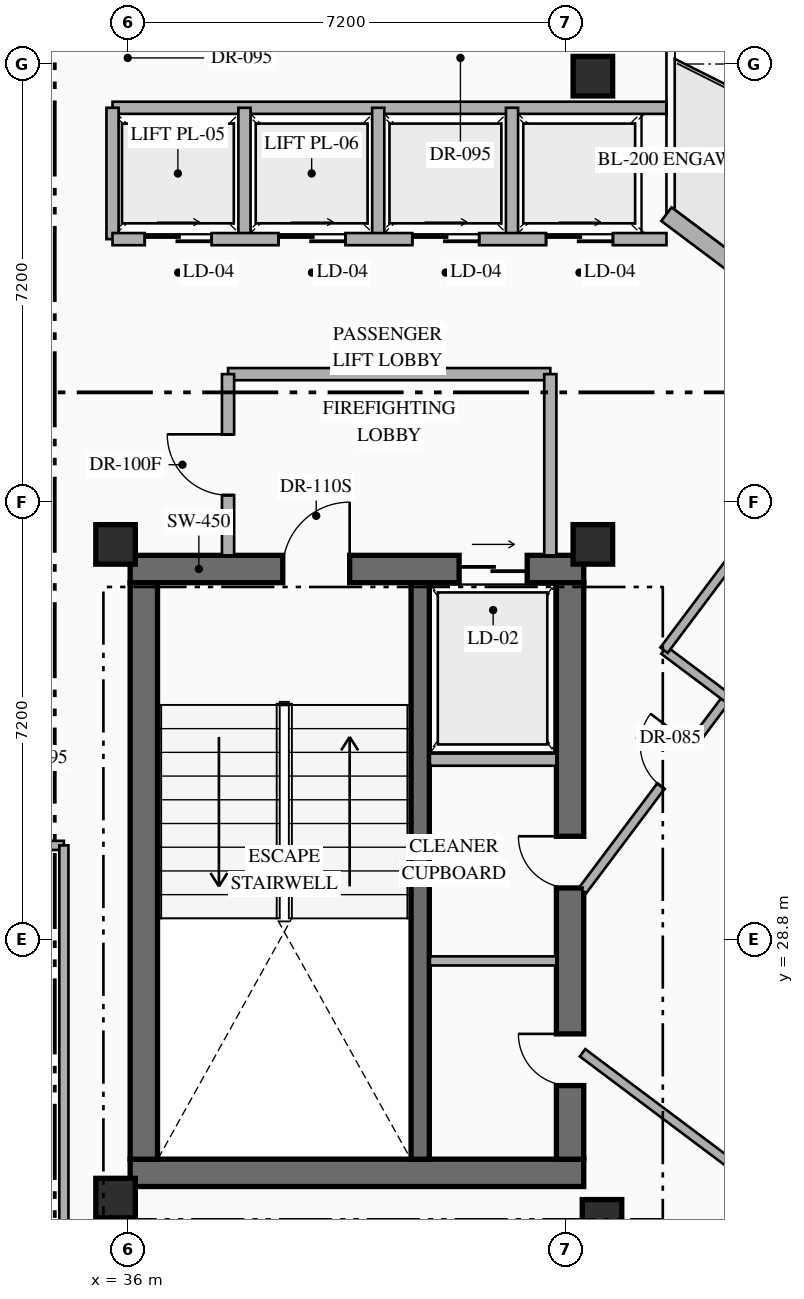
"""IFC4 building model, lengths in metres.
Left out: names, types, materials, properties, quantities, classifications, styles, units other than length and angle.
Written with IfcOpenShell. Run it as: python <this file> out.ifc"""

import sys

from ifc_helpers import new_model, si_unit, direction, frame, frame_2d, origin, origin_2d, place, context, subcontext, project, spatial, rectangle, hollow_rectangle, extrude, element, fill, save


model = new_model("IFC4")
c1 = context("Model", 3, precision=1e-05, world=origin(), true_north=direction((0.0, 1.0)))
c2 = subcontext(c1, "Body", "Model", "MODEL_VIEW")
j1 = project(units=[si_unit("LENGTHUNIT", "METRE"), si_unit("PLANEANGLEUNIT", "RADIAN")], contexts=[c1])
p1 = place(None, origin())
s1 = spatial("IfcSite", under=j1, at=p1, CompositionType="ELEMENT")
p2 = place(p1, origin())
s2 = spatial("IfcBuilding", under=s1, at=p2, CompositionType="ELEMENT")
p3 = place(p2, frame((0.0, 0.0, 246.75)))
s3 = spatial("IfcBuildingStorey", under=s2, at=p3, CompositionType="ELEMENT", Elevation=246.75)
p4 = place(p3, frame((36.04, 24.965, 0.0), z_axis=(0.0, 0.0, 1.0), x_axis=(1.0, 0.0, 0.0)))
e1 = element("IfcWall", 1, at=p4, inside=s3, PredefinedType="SHEAR", context=c2, shape_type="SweptSolid", body=[
    extrude(rectangle(XDim=7.46, YDim=0.45, at=frame_2d((3.73, 0.0))), origin(), (0.0, 0.0, 1.0), 3.6),
])
p5 = place(p3, frame((36.04, 34.895, 0.0), z_axis=(0.0, 0.0, 1.0), x_axis=(1.0, 0.0, 0.0)))
e2 = element("IfcWall", 2, at=p5, inside=s3, PredefinedType="SHEAR", context=c2, shape_type="SweptSolid", body=[
    extrude(rectangle(XDim=7.46, YDim=0.45, at=frame_2d((3.73, 0.0))), origin(), (0.0, 0.0, 1.0), 3.6),
])
p6 = place(p5, frame((2.51, 0.0, 0.0)))
e3 = element("IfcOpeningElement", 3, at=p6, cuts=e2, PredefinedType="OPENING", context=c2, shape_type="SweptSolid", body=[
    extrude(rectangle(XDim=1.1, YDim=2.2, at=frame_2d((0.55, 1.1))), frame((0.0, 0.235, 0.0), z_axis=(0.0, -1.0, 0.0), x_axis=(1.0, 0.0, 0.0)), (0.0, 0.0, 1.0), 0.47),
])
p7 = place(p5, frame((5.41, 0.0, 0.0)))
e4 = element("IfcOpeningElement", 4, at=p7, cuts=e2, PredefinedType="OPENING", context=c2, shape_type="SweptSolid", body=[
    extrude(rectangle(XDim=1.12, YDim=2.15, at=frame_2d((0.56, 1.075))), frame((0.0, 0.235, 0.0), z_axis=(0.0, -1.0, 0.0), x_axis=(1.0, 0.0, 0.0)), (0.0, 0.0, 1.0), 0.47),
])
p8 = place(p3, frame((36.265, 25.19, 0.0), z_axis=(0.0, 0.0, 1.0), x_axis=(0.0, 1.0, 0.0)))
e5 = element("IfcWall", 5, at=p8, inside=s3, PredefinedType="SHEAR", context=c2, shape_type="SweptSolid", body=[
    extrude(rectangle(XDim=9.48, YDim=0.45, at=frame_2d((4.74, 0.0))), origin(), (0.0, 0.0, 1.0), 3.6),
])
p9 = place(p3, frame((43.275, 25.19, 0.0), z_axis=(0.0, 0.0, 1.0), x_axis=(0.0, 1.0, 0.0)))
e6 = element("IfcWall", 6, at=p9, inside=s3, PredefinedType="SHEAR", context=c2, shape_type="SweptSolid", body=[
    extrude(rectangle(XDim=9.48, YDim=0.45, at=frame_2d((4.74, 0.0))), origin(), (0.0, 0.0, 1.0), 3.6),
])
p10 = place(p9, frame((1.21, 0.0, 0.0)))
e7 = element("IfcOpeningElement", 7, at=p10, cuts=e6, PredefinedType="OPENING", context=c2, shape_type="SweptSolid", body=[
    extrude(rectangle(XDim=0.85, YDim=2.08, at=frame_2d((0.425, 1.04))), frame((0.0, 0.235, 0.0), z_axis=(0.0, -1.0, 0.0), x_axis=(1.0, 0.0, 0.0)), (0.0, 0.0, 1.0), 0.47),
])
p11 = place(p9, frame((4.46, 0.0, 0.0)))
e8 = element("IfcOpeningElement", 8, at=p11, cuts=e6, PredefinedType="OPENING", context=c2, shape_type="SweptSolid", body=[
    extrude(rectangle(XDim=0.85, YDim=2.08, at=frame_2d((0.425, 1.04))), frame((0.0, 0.235, 0.0), z_axis=(0.0, -1.0, 0.0), x_axis=(1.0, 0.0, 0.0)), (0.0, 0.0, 1.0), 0.47),
])
p12 = place(p3, frame((40.81, 25.19, 0.0), z_axis=(0.0, 0.0, 1.0), x_axis=(0.0, 1.0, 0.0)))
e9 = element("IfcWall", 9, at=p12, inside=s3, PredefinedType="SHEAR", context=c2, shape_type="SweptSolid", body=[
    extrude(rectangle(XDim=9.48, YDim=0.3, at=frame_2d((4.74, 0.0))), origin(), (0.0, 0.0, 1.0), 3.6),
])
for number, where, z_axis, x_axis in (
    (10, (35.8, 24.55, 0.0), (0.0, 0.0, 1.0), (1.0, 0.0, 0.0)),
    (11, (43.8, 24.2, 0.0), (0.0, 0.0, 1.0), (1.0, 0.0, 0.0)),
    (12, (35.8, 35.3, 0.0), (0.0, 0.0, 1.0), (1.0, 0.0, 0.0)),
    (13, (43.65, 35.3, 0.0), (0.0, 0.0, 1.0), (1.0, 0.0, 0.0)),
    (14, (43.65, 43.0, 0.0), (0.0, 0.0, 1.0), (1.0, 0.0, 0.0)),
):
    element("IfcColumn", number, at=place(p3, frame(where, z_axis=z_axis, x_axis=x_axis)), inside=s3, PredefinedType="COLUMN", context=c2, shape_type="SweptSolid", body=[
        extrude(hollow_rectangle(XDim=0.65, YDim=0.65, WallThickness=0.025, at=origin_2d()), origin(), (0.0, 0.0, 1.0), 3.6),
    ])
p13 = place(p3, frame((44.86, 40.73, 0.0), z_axis=(0.0, 0.0, 1.0), x_axis=(0.800022950109, -0.599969398635, 0.0)))
e15 = element("IfcWall", 15, at=p13, inside=s3, PredefinedType="STANDARD", context=c2, shape_type="SweptSolid", body=[
    extrude(rectangle(XDim=10.212, YDim=0.28, at=frame_2d((5.106, 0.0))), origin(), (0.0, 0.0, 1.0), 3.35),
])
p14 = place(p13, frame((1.901, 0.0, 0.0)))
e16 = element("IfcOpeningElement", 16, at=p14, cuts=e15, PredefinedType="OPENING", context=c2, shape_type="SweptSolid", body=[
    extrude(rectangle(XDim=1.1, YDim=2.2, at=frame_2d((0.55, 1.1))), frame((0.0, 0.15, 0.0), z_axis=(0.0, -1.0, 0.0), x_axis=(1.0, 0.0, 0.0)), (0.0, 0.0, 1.0), 0.3),
])
p15 = place(p13, frame((5.84, 0.0, 0.85)))
e17 = element("IfcOpeningElement", 17, at=p15, cuts=e15, PredefinedType="OPENING", context=c2, shape_type="SweptSolid", body=[
    extrude(rectangle(XDim=1.8, YDim=2.1, at=frame_2d((0.9, 1.05))), frame((0.0, 0.15, 0.0), z_axis=(0.0, -1.0, 0.0), x_axis=(1.0, 0.0, 0.0)), (0.0, 0.0, 1.0), 0.3),
])
p16 = place(p3, frame((40.97, 31.76, 0.0), z_axis=(0.0, 0.0, 1.0), x_axis=(1.0, 0.0, 0.0)))
e18 = element("IfcWall", 18, at=p16, inside=s3, PredefinedType="STANDARD", context=c2, shape_type="SweptSolid", body=[
    extrude(rectangle(XDim=2.08, YDim=0.2, at=frame_2d((1.04, 0.0))), origin(), (0.0, 0.0, 1.0), 3.35),
])
p17 = place(p3, frame((40.97, 28.45, 0.0), z_axis=(0.0, 0.0, 1.0), x_axis=(1.0, 0.0, 0.0)))
e19 = element("IfcWall", 19, at=p17, inside=s3, PredefinedType="PARTITIONING", context=c2, shape_type="SweptSolid", body=[
    extrude(rectangle(XDim=2.08, YDim=0.15, at=frame_2d((1.04, 0.0))), origin(), (0.0, 0.0, 1.0), 3.35),
])
p18 = place(p3, frame((37.65, 38.1, 0.0), z_axis=(0.0, 0.0, 1.0), x_axis=(1.0, 0.0, 0.0)))
e20 = element("IfcWall", 20, at=p18, inside=s3, PredefinedType="STANDARD", context=c2, shape_type="SweptSolid", body=[
    extrude(rectangle(XDim=5.3, YDim=0.2, at=frame_2d((2.65, 0.0))), origin(), (0.0, 0.0, 1.0), 3.35),
])
p19 = place(p3, frame((42.95, 35.12, 0.0), z_axis=(0.0, 0.0, 1.0), x_axis=(0.0, 1.0, 0.0)))
e21 = element("IfcWall", 21, at=p19, inside=s3, PredefinedType="STANDARD", context=c2, shape_type="SweptSolid", body=[
    extrude(rectangle(XDim=2.98, YDim=0.2, at=frame_2d((1.49, 0.0))), origin(), (0.0, 0.0, 1.0), 3.35),
])
p20 = place(p3, frame((37.65, 35.12, 0.0), z_axis=(0.0, 0.0, 1.0), x_axis=(0.0, 1.0, 0.0)))
e22 = element("IfcWall", 22, at=p20, inside=s3, PredefinedType="STANDARD", context=c2, shape_type="SweptSolid", body=[
    extrude(rectangle(XDim=2.98, YDim=0.2, at=frame_2d((1.49, 0.0))), origin(), (0.0, 0.0, 1.0), 3.35),
])
p21 = place(p20, frame((0.99, 0.0, 0.0)))
e23 = element("IfcOpeningElement", 23, at=p21, cuts=e22, PredefinedType="OPENING", context=c2, shape_type="SweptSolid", body=[
    extrude(rectangle(XDim=1.0, YDim=2.2, at=frame_2d((0.5, 1.1))), frame((0.0, 0.11, 0.0), z_axis=(0.0, -1.0, 0.0), x_axis=(1.0, 0.0, 0.0)), (0.0, 0.0, 1.0), 0.22),
])
p22 = place(p3, frame((35.75, 42.48, 0.0), z_axis=(0.0, 0.0, 1.0), x_axis=(1.0, 0.0, 0.0)))
e24 = element("IfcWall", 24, at=p22, inside=s3, PredefinedType="STANDARD", context=c2, shape_type="SweptSolid", body=[
    extrude(rectangle(XDim=9.11, YDim=0.2, at=frame_2d((4.555, 0.0))), origin(), (0.0, 0.0, 1.0), 3.35),
])
for number, where, z_axis, x_axis in (
    (25, (35.75, 40.32, 0.0), (0.0, 0.0, 1.0), (0.0, 1.0, 0.0)),
    (26, (37.92, 40.32, 0.0), (0.0, 0.0, 1.0), (0.0, 1.0, 0.0)),
    (27, (40.12, 40.32, 0.0), (0.0, 0.0, 1.0), (0.0, 1.0, 0.0)),
    (28, (42.32, 40.32, 0.0), (0.0, 0.0, 1.0), (0.0, 1.0, 0.0)),
):
    element("IfcWall", number, at=place(p3, frame(where, z_axis=z_axis, x_axis=x_axis)), inside=s3, PredefinedType="STANDARD", context=c2, shape_type="SweptSolid", body=[
        extrude(rectangle(XDim=2.16, YDim=0.2, at=frame_2d((1.08, 0.0))), origin(), (0.0, 0.0, 1.0), 3.35),
    ])
p23 = place(p3, frame((35.75, 40.32, 0.0), z_axis=(0.0, 0.0, 1.0), x_axis=(1.0, 0.0, 0.0)))
e29 = element("IfcWall", 29, at=p23, inside=s3, PredefinedType="STANDARD", context=c2, shape_type="SweptSolid", body=[
    extrude(rectangle(XDim=9.11, YDim=0.2, at=frame_2d((4.555, 0.0))), origin(), (0.0, 0.0, 1.0), 3.35),
])
p24 = place(p23, frame((0.53, 0.0, 0.0)))
e30 = element("IfcOpeningElement", 30, at=p24, cuts=e29, PredefinedType="OPENING", context=c2, shape_type="SweptSolid", body=[
    extrude(rectangle(XDim=1.1, YDim=2.18, at=frame_2d((0.55, 1.09))), frame((0.0, 0.11, 0.0), z_axis=(0.0, -1.0, 0.0), x_axis=(1.0, 0.0, 0.0)), (0.0, 0.0, 1.0), 0.22),
])
p25 = place(p23, frame((2.73, 0.0, 0.0)))
e31 = element("IfcOpeningElement", 31, at=p25, cuts=e29, PredefinedType="OPENING", context=c2, shape_type="SweptSolid", body=[
    extrude(rectangle(XDim=1.1, YDim=2.18, at=frame_2d((0.55, 1.09))), frame((0.0, 0.11, 0.0), z_axis=(0.0, -1.0, 0.0), x_axis=(1.0, 0.0, 0.0)), (0.0, 0.0, 1.0), 0.22),
])
p26 = place(p23, frame((4.93, 0.0, 0.0)))
e32 = element("IfcOpeningElement", 32, at=p26, cuts=e29, PredefinedType="OPENING", context=c2, shape_type="SweptSolid", body=[
    extrude(rectangle(XDim=1.1, YDim=2.18, at=frame_2d((0.55, 1.09))), frame((0.0, 0.11, 0.0), z_axis=(0.0, -1.0, 0.0), x_axis=(1.0, 0.0, 0.0)), (0.0, 0.0, 1.0), 0.22),
])
p27 = place(p23, frame((7.13, 0.0, 0.0)))
e33 = element("IfcOpeningElement", 33, at=p27, cuts=e29, PredefinedType="OPENING", context=c2, shape_type="SweptSolid", body=[
    extrude(rectangle(XDim=1.1, YDim=2.18, at=frame_2d((0.55, 1.09))), frame((0.0, 0.11, 0.0), z_axis=(0.0, -1.0, 0.0), x_axis=(1.0, 0.0, 0.0)), (0.0, 0.0, 1.0), 0.22),
])
p28 = place(p3, frame((30.5, 30.35, 0.0), z_axis=(0.0, 0.0, 1.0), x_axis=(1.0, 0.0, 0.0)))
e34 = element("IfcWall", 34, at=p28, inside=s3, PredefinedType="PARTITIONING", context=c2, shape_type="SweptSolid", body=[
    extrude(rectangle(XDim=4.45, YDim=0.15, at=frame_2d((2.225, 0.0))), origin(), (0.0, 0.0, 1.0), 3.35),
])
p29 = place(p28, frame((2.846, 0.0, 0.0)))
e35 = element("IfcOpeningElement", 35, at=p29, cuts=e34, PredefinedType="OPENING", context=c2, shape_type="SweptSolid", body=[
    extrude(rectangle(XDim=0.95, YDim=2.15, at=frame_2d((0.475, 1.075))), frame((0.0, 0.085, 0.0), z_axis=(0.0, -1.0, 0.0), x_axis=(1.0, 0.0, 0.0)), (0.0, 0.0, 1.0), 0.17),
])
p30 = place(p3, frame((34.95, 23.2, 0.0), z_axis=(0.0, 0.0, 1.0), x_axis=(0.0, 1.0, 0.0)))
e36 = element("IfcWall", 36, at=p30, inside=s3, PredefinedType="PARTITIONING", context=c2, shape_type="SweptSolid", body=[
    extrude(rectangle(XDim=7.15, YDim=0.15, at=frame_2d((3.575, 0.0))), origin(), (0.0, 0.0, 1.0), 3.35),
])
p31 = place(p3, frame((43.48, 26.94, 0.0), z_axis=(0.0, 0.0, 1.0), x_axis=(0.80000536583, -0.599992845493, 0.0)))
e37 = element("IfcWall", 37, at=p31, inside=s3, PredefinedType="PARTITIONING", context=c2, shape_type="SweptSolid", body=[
    extrude(rectangle(XDim=5.46, YDim=0.15, at=frame_2d((2.73, 0.0))), origin(), (0.0, 0.0, 1.0), 3.35),
])
p32 = place(p3, frame((43.48, 29.607, 0.0), z_axis=(0.0, 0.0, 1.0), x_axis=(0.600049238723, 0.79996306859, 0.0)))
e38 = element("IfcWall", 38, at=p32, inside=s3, PredefinedType="PARTITIONING", context=c2, shape_type="SweptSolid", body=[
    extrude(rectangle(XDim=3.967, YDim=0.15, at=frame_2d((1.983, 0.0))), origin(), (0.0, 0.0, 1.0), 3.35),
])
p33 = place(p32, frame((2.147, 0.0, 0.0)))
e39 = element("IfcOpeningElement", 39, at=p33, cuts=e38, PredefinedType="OPENING", context=c2, shape_type="SweptSolid", body=[
    extrude(rectangle(XDim=0.85, YDim=2.08, at=frame_2d((0.425, 1.04))), frame((0.0, 0.085, 0.0), z_axis=(0.0, -1.0, 0.0), x_axis=(1.0, 0.0, 0.0)), (0.0, 0.0, 1.0), 0.17),
])
p34 = place(p3, frame((44.82, 33.56, 0.0), z_axis=(0.0, 0.0, 1.0), x_axis=(0.8, -0.6, 0.0)))
e40 = element("IfcWall", 40, at=p34, inside=s3, PredefinedType="PARTITIONING", context=c2, shape_type="SweptSolid", body=[
    extrude(rectangle(XDim=1.3, YDim=0.15, at=frame_2d((0.65, 0.0))), origin(), (0.0, 0.0, 1.0), 3.35),
])
p35 = place(p3, frame((44.82, 33.56, 0.0), z_axis=(0.0, 0.0, 1.0), x_axis=(0.599986667805, 0.800009998972, 0.0)))
e41 = element("IfcWall", 41, at=p35, inside=s3, PredefinedType="PARTITIONING", context=c2, shape_type="SweptSolid", body=[
    extrude(rectangle(XDim=5.86, YDim=0.15, at=frame_2d((2.93, 0.0))), origin(), (0.0, 0.0, 1.0), 3.35),
])
p36 = place(p35, frame((2.69, 0.0, 0.0)))
e42 = element("IfcOpeningElement", 42, at=p36, cuts=e41, PredefinedType="OPENING", context=c2, shape_type="SweptSolid", body=[
    extrude(rectangle(XDim=0.9, YDim=2.15, at=frame_2d((0.45, 1.075))), frame((0.0, 0.085, 0.0), z_axis=(0.0, -1.0, 0.0), x_axis=(1.0, 0.0, 0.0)), (0.0, 0.0, 1.0), 0.17),
])
p37 = place(p3, frame((27.91, 26.68, 0.0), z_axis=(0.0, 0.0, 1.0), x_axis=(0.8, -0.6, 0.0)))
e43 = element("IfcWall", 43, at=p37, inside=s3, PredefinedType="PARTITIONING", context=c2, shape_type="SweptSolid", body=[
    extrude(rectangle(XDim=17.76, YDim=0.15, at=frame_2d((8.88, 0.0))), origin(), (0.0, 0.0, 1.0), 3.35),
])
p38 = place(p37, frame((11.294, 0.0, 0.0)))
e44 = element("IfcOpeningElement", 44, at=p38, cuts=e43, PredefinedType="OPENING", context=c2, shape_type="SweptSolid", body=[
    extrude(rectangle(XDim=0.95, YDim=2.15, at=frame_2d((0.475, 1.075))), frame((0.0, 0.085, 0.0), z_axis=(0.0, -1.0, 0.0), x_axis=(1.0, 0.0, 0.0)), (0.0, 0.0, 1.0), 0.17),
])
p39 = place(p6, origin())
e45 = element("IfcDoor", 45, at=p39, inside=s3, OperationType="SINGLE_SWING_RIGHT", PredefinedType="DOOR", context=c2, shape_type="SweptSolid", body=[
    extrude(rectangle(XDim=1.1, YDim=2.2, at=frame_2d((0.55, 1.1))), frame((0.0, 0.025, 0.0), z_axis=(0.0, -1.0, 0.0), x_axis=(1.0, 0.0, 0.0)), (0.0, 0.0, 1.0), 0.05),
])
fill(e3, e45)
p40 = place(p7, origin())
e46 = element("IfcDoor", 46, at=p40, inside=s3, OperationType="SLIDING_TO_RIGHT", PredefinedType="USERDEFINED", context=c2, shape_type="SweptSolid", body=[
    extrude(rectangle(XDim=1.12, YDim=2.15, at=frame_2d((0.56, 1.075))), frame((0.0, 0.025, 0.0), z_axis=(0.0, -1.0, 0.0), x_axis=(1.0, 0.0, 0.0)), (0.0, 0.0, 1.0), 0.05),
])
fill(e4, e46)
p41 = place(p10, origin())
e47 = element("IfcDoor", 47, at=p41, inside=s3, OperationType="SINGLE_SWING_RIGHT", PredefinedType="DOOR", context=c2, shape_type="SweptSolid", body=[
    extrude(rectangle(XDim=0.85, YDim=2.08, at=frame_2d((0.425, 1.04))), frame((0.0, 0.025, 0.0), z_axis=(0.0, -1.0, 0.0), x_axis=(1.0, 0.0, 0.0)), (0.0, 0.0, 1.0), 0.05),
])
fill(e7, e47)
p42 = place(p11, origin())
e48 = element("IfcDoor", 48, at=p42, inside=s3, OperationType="SINGLE_SWING_RIGHT", PredefinedType="DOOR", context=c2, shape_type="SweptSolid", body=[
    extrude(rectangle(XDim=0.85, YDim=2.08, at=frame_2d((0.425, 1.04))), frame((0.0, 0.025, 0.0), z_axis=(0.0, -1.0, 0.0), x_axis=(1.0, 0.0, 0.0)), (0.0, 0.0, 1.0), 0.05),
])
fill(e8, e48)
p43 = place(p21, origin())
e49 = element("IfcDoor", 49, at=p43, inside=s3, OperationType="SINGLE_SWING_RIGHT", PredefinedType="DOOR", context=c2, shape_type="SweptSolid", body=[
    extrude(rectangle(XDim=1.0, YDim=2.2, at=frame_2d((0.5, 1.1))), frame((0.0, 0.025, 0.0), z_axis=(0.0, -1.0, 0.0), x_axis=(1.0, 0.0, 0.0)), (0.0, 0.0, 1.0), 0.05),
])
fill(e23, e49)
p44 = place(p24, origin())
e50 = element("IfcDoor", 50, at=p44, inside=s3, OperationType="SLIDING_TO_RIGHT", PredefinedType="USERDEFINED", context=c2, shape_type="SweptSolid", body=[
    extrude(rectangle(XDim=1.1, YDim=2.18, at=frame_2d((0.55, 1.09))), frame((0.0, 0.025, 0.0), z_axis=(0.0, -1.0, 0.0), x_axis=(1.0, 0.0, 0.0)), (0.0, 0.0, 1.0), 0.05),
])
fill(e30, e50)
p45 = place(p25, origin())
e51 = element("IfcDoor", 51, at=p45, inside=s3, OperationType="SLIDING_TO_RIGHT", PredefinedType="USERDEFINED", context=c2, shape_type="SweptSolid", body=[
    extrude(rectangle(XDim=1.1, YDim=2.18, at=frame_2d((0.55, 1.09))), frame((0.0, 0.025, 0.0), z_axis=(0.0, -1.0, 0.0), x_axis=(1.0, 0.0, 0.0)), (0.0, 0.0, 1.0), 0.05),
])
fill(e31, e51)
p46 = place(p26, origin())
e52 = element("IfcDoor", 52, at=p46, inside=s3, OperationType="SLIDING_TO_RIGHT", PredefinedType="USERDEFINED", context=c2, shape_type="SweptSolid", body=[
    extrude(rectangle(XDim=1.1, YDim=2.18, at=frame_2d((0.55, 1.09))), frame((0.0, 0.025, 0.0), z_axis=(0.0, -1.0, 0.0), x_axis=(1.0, 0.0, 0.0)), (0.0, 0.0, 1.0), 0.05),
])
fill(e32, e52)
p47 = place(p27, origin())
e53 = element("IfcDoor", 53, at=p47, inside=s3, OperationType="SLIDING_TO_RIGHT", PredefinedType="USERDEFINED", context=c2, shape_type="SweptSolid", body=[
    extrude(rectangle(XDim=1.1, YDim=2.18, at=frame_2d((0.55, 1.09))), frame((0.0, 0.025, 0.0), z_axis=(0.0, -1.0, 0.0), x_axis=(1.0, 0.0, 0.0)), (0.0, 0.0, 1.0), 0.05),
])
fill(e33, e53)
p48 = place(p33, origin())
e54 = element("IfcDoor", 54, at=p48, inside=s3, OperationType="SINGLE_SWING_RIGHT", PredefinedType="DOOR", context=c2, shape_type="SweptSolid", body=[
    extrude(rectangle(XDim=0.85, YDim=2.08, at=frame_2d((0.425, 1.04))), frame((0.0, 0.025, 0.0), z_axis=(0.0, -1.0, 0.0), x_axis=(1.0, 0.0, 0.0)), (0.0, 0.0, 1.0), 0.05),
])
fill(e39, e54)
save(model, sys.argv[1])
